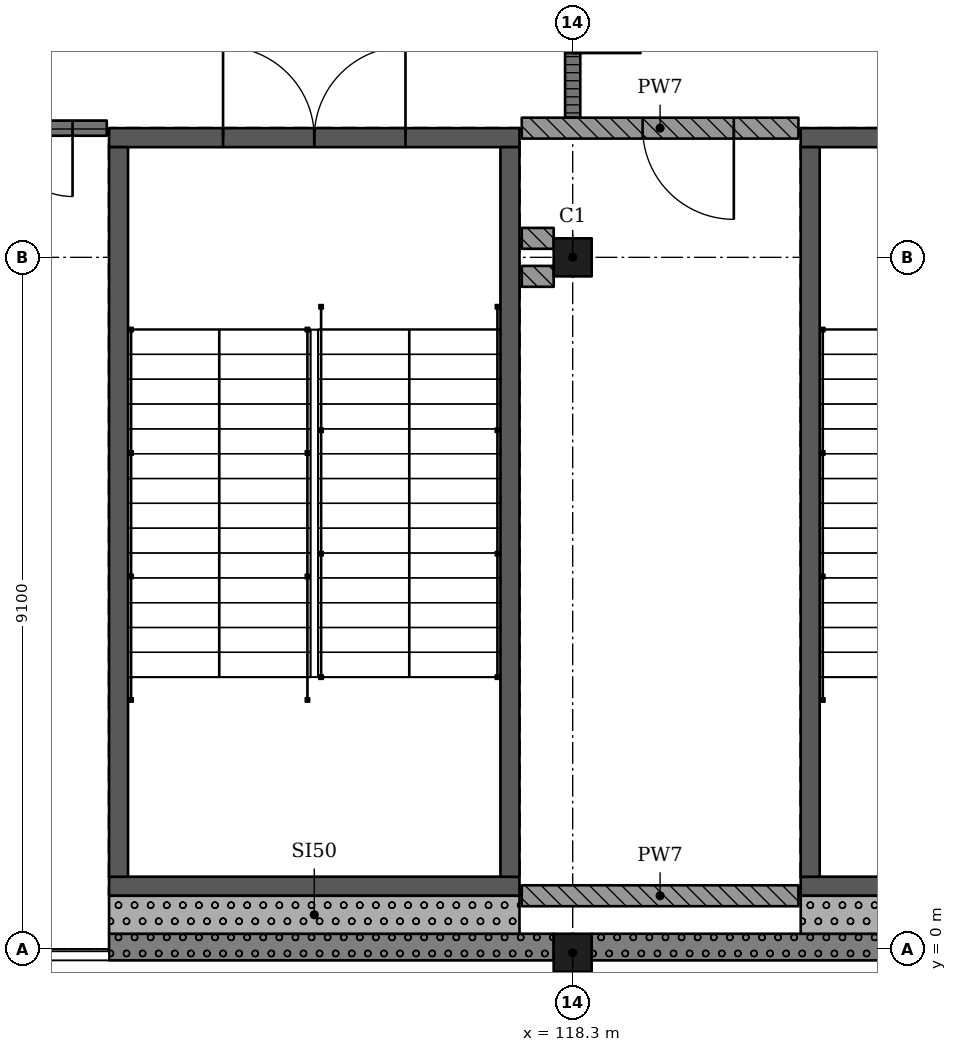
"""IFC4 building model, lengths in metres.
Left out: names, types, materials, properties, quantities, classifications, styles, units other than length and angle.
Written with IfcOpenShell. Run it as: python <this file> out.ifc"""

import sys

from ifc_helpers import new_model, si_unit, direction, frame, frame_2d, origin, origin_2d, place, context, subcontext, project, spatial, rectangle, extrude, element, fill, save


model = new_model("IFC4")
c1 = context("Model", 3, precision=1e-05, world=origin(), true_north=direction((0.0, 1.0)))
c2 = subcontext(c1, "Body", "Model", "MODEL_VIEW")
j1 = project(units=[si_unit("LENGTHUNIT", "METRE"), si_unit("PLANEANGLEUNIT", "RADIAN")], contexts=[c1])
p1 = place(None, origin())
s1 = spatial("IfcSite", under=j1, at=p1, CompositionType="ELEMENT")
p2 = place(p1, origin())
s2 = spatial("IfcBuilding", under=s1, at=p2, CompositionType="ELEMENT")
p3 = place(p2, frame((0.0, 0.0, 20.02)))
s3 = spatial("IfcBuildingStorey", under=s2, at=p3, CompositionType="ELEMENT", Elevation=20.02)
for number, where, z_axis, x_axis in (
    (1, (118.3, -0.05, 0.0), (0.0, 0.0, 1.0), (1.0, 0.0, 0.0)),
    (2, (118.3, 9.1, 0.0), (0.0, 0.0, 1.0), (1.0, 0.0, 0.0)),
):
    element("IfcColumn", number, at=place(p3, frame(where, z_axis=z_axis, x_axis=x_axis)), inside=s3, PredefinedType="COLUMN", context=c2, shape_type="SweptSolid", body=[
        extrude(rectangle(XDim=0.5, YDim=0.5, at=origin_2d()), origin(), (0.0, 0.0, 1.0), 4.55),
    ])
p4 = place(p3, frame((126.7, 0.825, 0.0), z_axis=(0.0, 0.0, 1.0), x_axis=(-1.0, 0.0, 0.0)))
e3 = element("IfcWall", 3, at=p4, inside=s3, PredefinedType="SHEAR", context=c2, shape_type="SweptSolid", body=[
    extrude(rectangle(XDim=5.4, YDim=0.25, at=frame_2d((2.7, 0.0))), origin(), (0.0, 0.0, 1.0), 4.55),
])
p5 = place(p3, frame((126.7, 10.675, 0.0), z_axis=(0.0, 0.0, 1.0), x_axis=(-1.0, 0.0, 0.0)))
e4 = element("IfcWall", 4, at=p5, inside=s3, PredefinedType="SHEAR", context=c2, shape_type="SweptSolid", body=[
    extrude(rectangle(XDim=5.4, YDim=0.25, at=frame_2d((2.7, 0.0))), origin(), (0.0, 0.0, 1.0), 4.55),
])
p6 = place(p5, frame((1.5, 0.0, 0.0)))
e5 = element("IfcOpeningElement", 5, at=p6, cuts=e4, PredefinedType="OPENING", context=c2, shape_type="SweptSolid", body=[
    extrude(rectangle(XDim=2.4, YDim=2.1, at=frame_2d((1.2, 1.05))), frame((0.0, 0.135, 0.0), z_axis=(0.0, -1.0, 0.0), x_axis=(1.0, 0.0, 0.0)), (0.0, 0.0, 1.0), 0.27),
])
p7 = place(p3, frame((121.425, 10.55, 0.0), z_axis=(0.0, 0.0, 1.0), x_axis=(0.0, -1.0, 0.0)))
e6 = element("IfcWall", 6, at=p7, inside=s3, PredefinedType="SHEAR", context=c2, shape_type="SweptSolid", body=[
    extrude(rectangle(XDim=9.6, YDim=0.25, at=frame_2d((4.8, 0.0))), origin(), (0.0, 0.0, 1.0), 4.55),
])
p8 = place(p3, frame((117.6, 0.825, 0.0), z_axis=(0.0, 0.0, 1.0), x_axis=(-1.0, 0.0, 0.0)))
e7 = element("IfcWall", 7, at=p8, inside=s3, PredefinedType="SHEAR", context=c2, shape_type="SweptSolid", body=[
    extrude(rectangle(XDim=5.4, YDim=0.25, at=frame_2d((2.7, 0.0))), origin(), (0.0, 0.0, 1.0), 4.55),
])
p9 = place(p3, frame((117.6, 10.675, 0.0), z_axis=(0.0, 0.0, 1.0), x_axis=(-1.0, 0.0, 0.0)))
e8 = element("IfcWall", 8, at=p9, inside=s3, PredefinedType="SHEAR", context=c2, shape_type="SweptSolid", body=[
    extrude(rectangle(XDim=5.4, YDim=0.25, at=frame_2d((2.7, 0.0))), origin(), (0.0, 0.0, 1.0), 4.55),
])
p10 = place(p9, frame((1.5, 0.0, 0.0)))
e9 = element("IfcOpeningElement", 9, at=p10, cuts=e8, PredefinedType="OPENING", context=c2, shape_type="SweptSolid", body=[
    extrude(rectangle(XDim=2.4, YDim=2.1, at=frame_2d((1.2, 1.05))), frame((0.0, 0.135, 0.0), z_axis=(0.0, -1.0, 0.0), x_axis=(1.0, 0.0, 0.0)), (0.0, 0.0, 1.0), 0.27),
])
for number, where, z_axis, x_axis in (
    (10, (112.325, 10.55, 0.0), (0.0, 0.0, 1.0), (0.0, -1.0, 0.0)),
    (11, (117.475, 10.55, 0.0), (0.0, 0.0, 1.0), (0.0, -1.0, 0.0)),
):
    element("IfcWall", number, at=place(p3, frame(where, z_axis=z_axis, x_axis=x_axis)), inside=s3, PredefinedType="SHEAR", context=c2, shape_type="SweptSolid", body=[
        extrude(rectangle(XDim=9.6, YDim=0.25, at=frame_2d((4.8, 0.0))), origin(), (0.0, 0.0, 1.0), 4.55),
    ])
p11 = place(p3, frame((112.2, 0.025, 0.0), z_axis=(0.0, 0.0, 1.0), x_axis=(1.0, 0.0, 0.0)))
e12 = element("IfcWall", 12, at=p11, inside=s3, PredefinedType="SOLIDWALL", context=c2, shape_type="SweptSolid", body=[
    extrude(rectangle(XDim=5.85, YDim=0.35, at=frame_2d((2.925, 0.0))), origin(), (0.0, 0.0, 1.0), 3.5),
])
p12 = place(p3, frame((118.55, 0.025, 0.0), z_axis=(0.0, 0.0, 1.0), x_axis=(1.0, 0.0, 0.0)))
e13 = element("IfcWall", 13, at=p12, inside=s3, PredefinedType="SOLIDWALL", context=c2, shape_type="SweptSolid", body=[
    extrude(rectangle(XDim=8.6, YDim=0.35, at=frame_2d((4.3, 0.0))), origin(), (0.0, 0.0, 1.0), 3.5),
])
p13 = place(p3, frame((121.3, 0.45, 0.0), z_axis=(0.0, 0.0, 1.0), x_axis=(1.0, 0.0, 0.0)))
e14 = element("IfcWall", 14, at=p13, inside=s3, PredefinedType="SOLIDWALL", context=c2, shape_type="SweptSolid", body=[
    extrude(rectangle(XDim=5.4, YDim=0.5, at=frame_2d((2.7, 0.0))), origin(), (0.0, 0.0, 1.0), 4.25),
])
p14 = place(p3, frame((112.2, 0.45, 0.0), z_axis=(0.0, 0.0, 1.0), x_axis=(1.0, 0.0, 0.0)))
e15 = element("IfcWall", 15, at=p14, inside=s3, PredefinedType="SOLIDWALL", context=c2, shape_type="SweptSolid", body=[
    extrude(rectangle(XDim=5.4, YDim=0.5, at=frame_2d((2.7, 0.0))), origin(), (0.0, 0.0, 1.0), 4.25),
])
p15 = place(p3, frame((112.17, 10.8, 0.0), z_axis=(0.0, 0.0, 1.0), x_axis=(-1.0, 0.0, 0.0)))
e16 = element("IfcWall", 16, at=p15, inside=s3, PredefinedType="PARTITIONING", context=c2, shape_type="SweptSolid", body=[
    extrude(rectangle(XDim=2.77, YDim=0.2, at=frame_2d((1.385, 0.0))), origin(), (0.0, 0.0, 1.0), 4.25),
])
p16 = place(p15, frame((0.45, 0.0, 0.0)))
e17 = element("IfcOpeningElement", 17, at=p16, cuts=e16, PredefinedType="OPENING", context=c2, shape_type="SweptSolid", body=[
    extrude(rectangle(XDim=1.8, YDim=2.4, at=frame_2d((0.9, 1.2))), frame((0.0, 0.11, 0.0), z_axis=(0.0, -1.0, 0.0), x_axis=(1.0, 0.0, 0.0)), (0.0, 0.0, 1.0), 0.22),
])
for number, where, z_axis, x_axis in (
    (18, (117.63, 8.85, 0.0), (0.0, 0.0, 1.0), (1.0, 0.0, 0.0)),
    (19, (118.05, 9.35, 0.0), (0.0, 0.0, 1.0), (-1.0, 0.0, 0.0)),
):
    element("IfcWall", number, at=place(p3, frame(where, z_axis=z_axis, x_axis=x_axis)), inside=s3, PredefinedType="SOLIDWALL", context=c2, shape_type="SweptSolid", body=[
        extrude(rectangle(XDim=0.42, YDim=0.275, at=frame_2d((0.21, 0.0))), origin(), (0.0, 0.0, 1.0), 4.25),
    ])
p17 = place(p3, frame((117.63, 10.8, 0.0), z_axis=(0.0, 0.0, 1.0), x_axis=(1.0, 0.0, 0.0)))
e20 = element("IfcWall", 20, at=p17, inside=s3, PredefinedType="SOLIDWALL", context=c2, shape_type="SweptSolid", body=[
    extrude(rectangle(XDim=3.64, YDim=0.275, at=frame_2d((1.82, 0.0))), origin(), (0.0, 0.0, 1.0), 4.25),
])
p18 = place(p17, frame((1.59, 0.0, 0.0)))
e21 = element("IfcOpeningElement", 21, at=p18, cuts=e20, PredefinedType="OPENING", context=c2, shape_type="SweptSolid", body=[
    extrude(rectangle(XDim=1.2, YDim=2.4, at=frame_2d((0.6, 1.2))), frame((0.0, 0.147, 0.0), z_axis=(0.0, -1.0, 0.0), x_axis=(1.0, 0.0, 0.0)), (0.0, 0.0, 1.0), 0.295),
])
p19 = place(p3, frame((118.3, 10.938, 0.0), z_axis=(0.0, 0.0, 1.0), x_axis=(0.0, 1.0, 0.0)))
e22 = element("IfcWall", 22, at=p19, inside=s3, PredefinedType="PARTITIONING", context=c2, shape_type="SweptSolid", body=[
    extrude(rectangle(XDim=6.962, YDim=0.2, at=frame_2d((3.481, 0.0))), origin(), (0.0, 0.0, 1.0), 3.5),
])
p20 = place(p19, frame((0.85, 0.0, 0.0)))
e23 = element("IfcOpeningElement", 23, at=p20, cuts=e22, PredefinedType="OPENING", context=c2, shape_type="SweptSolid", body=[
    extrude(rectangle(XDim=1.8, YDim=2.4, at=frame_2d((0.9, 1.2))), frame((0.0, 0.11, 0.0), z_axis=(0.0, -1.0, 0.0), x_axis=(1.0, 0.0, 0.0)), (0.0, 0.0, 1.0), 0.22),
])
p21 = place(p19, frame((4.35, 0.0, 0.0)))
e24 = element("IfcOpeningElement", 24, at=p21, cuts=e22, PredefinedType="OPENING", context=c2, shape_type="SweptSolid", body=[
    extrude(rectangle(XDim=1.8, YDim=2.4, at=frame_2d((0.9, 1.2))), frame((0.0, 0.11, 0.0), z_axis=(0.0, -1.0, 0.0), x_axis=(1.0, 0.0, 0.0)), (0.0, 0.0, 1.0), 0.22),
])
p22 = place(p3, frame((121.27, 0.7, 0.0), z_axis=(0.0, 0.0, 1.0), x_axis=(-1.0, 0.0, 0.0)))
e25 = element("IfcWall", 25, at=p22, inside=s3, PredefinedType="SOLIDWALL", context=c2, shape_type="SweptSolid", body=[
    extrude(rectangle(XDim=3.64, YDim=0.275, at=frame_2d((1.82, 0.0))), origin(), (0.0, 0.0, 1.0), 4.25),
])
p23 = place(p18, origin())
e26 = element("IfcDoor", 26, at=p23, inside=s3, OperationType="SINGLE_SWING_RIGHT", PredefinedType="DOOR", context=c2, shape_type="SweptSolid", body=[
    extrude(rectangle(XDim=1.2, YDim=2.4, at=frame_2d((0.6, 1.2))), frame((0.0, 0.025, 0.0), z_axis=(0.0, -1.0, 0.0), x_axis=(1.0, 0.0, 0.0)), (0.0, 0.0, 1.0), 0.05),
])
fill(e21, e26)
p24 = place(p20, origin())
e27 = element("IfcDoor", 27, at=p24, inside=s3, OperationType="DOUBLE_DOOR_SINGLE_SWING", PredefinedType="DOOR", context=c2, shape_type="SweptSolid", body=[
    extrude(rectangle(XDim=1.8, YDim=2.4, at=frame_2d((0.9, 1.2))), frame((0.0, 0.025, 0.0), z_axis=(0.0, -1.0, 0.0), x_axis=(1.0, 0.0, 0.0)), (0.0, 0.0, 1.0), 0.05),
])
fill(e23, e27)
p25 = place(p16, origin())
e28 = element("IfcDoor", 28, at=p25, inside=s3, OperationType="DOUBLE_DOOR_SINGLE_SWING", PredefinedType="DOOR", context=c2, shape_type="SweptSolid", body=[
    extrude(rectangle(XDim=1.8, YDim=2.4, at=frame_2d((0.9, 1.2))), frame((0.0, 0.025, 0.0), z_axis=(0.0, -1.0, 0.0), x_axis=(1.0, 0.0, 0.0)), (0.0, 0.0, 1.0), 0.05),
])
fill(e17, e28)
p26 = place(p10, origin())
e29 = element("IfcDoor", 29, at=p26, inside=s3, OperationType="DOUBLE_DOOR_SINGLE_SWING", PredefinedType="DOOR", context=c2, shape_type="SweptSolid", body=[
    extrude(rectangle(XDim=2.4, YDim=2.1, at=frame_2d((1.2, 1.05))), frame((0.0, 0.025, 0.0), z_axis=(0.0, -1.0, 0.0), x_axis=(1.0, 0.0, 0.0)), (0.0, 0.0, 1.0), 0.05),
])
fill(e9, e29)
save(model, sys.argv[1])
